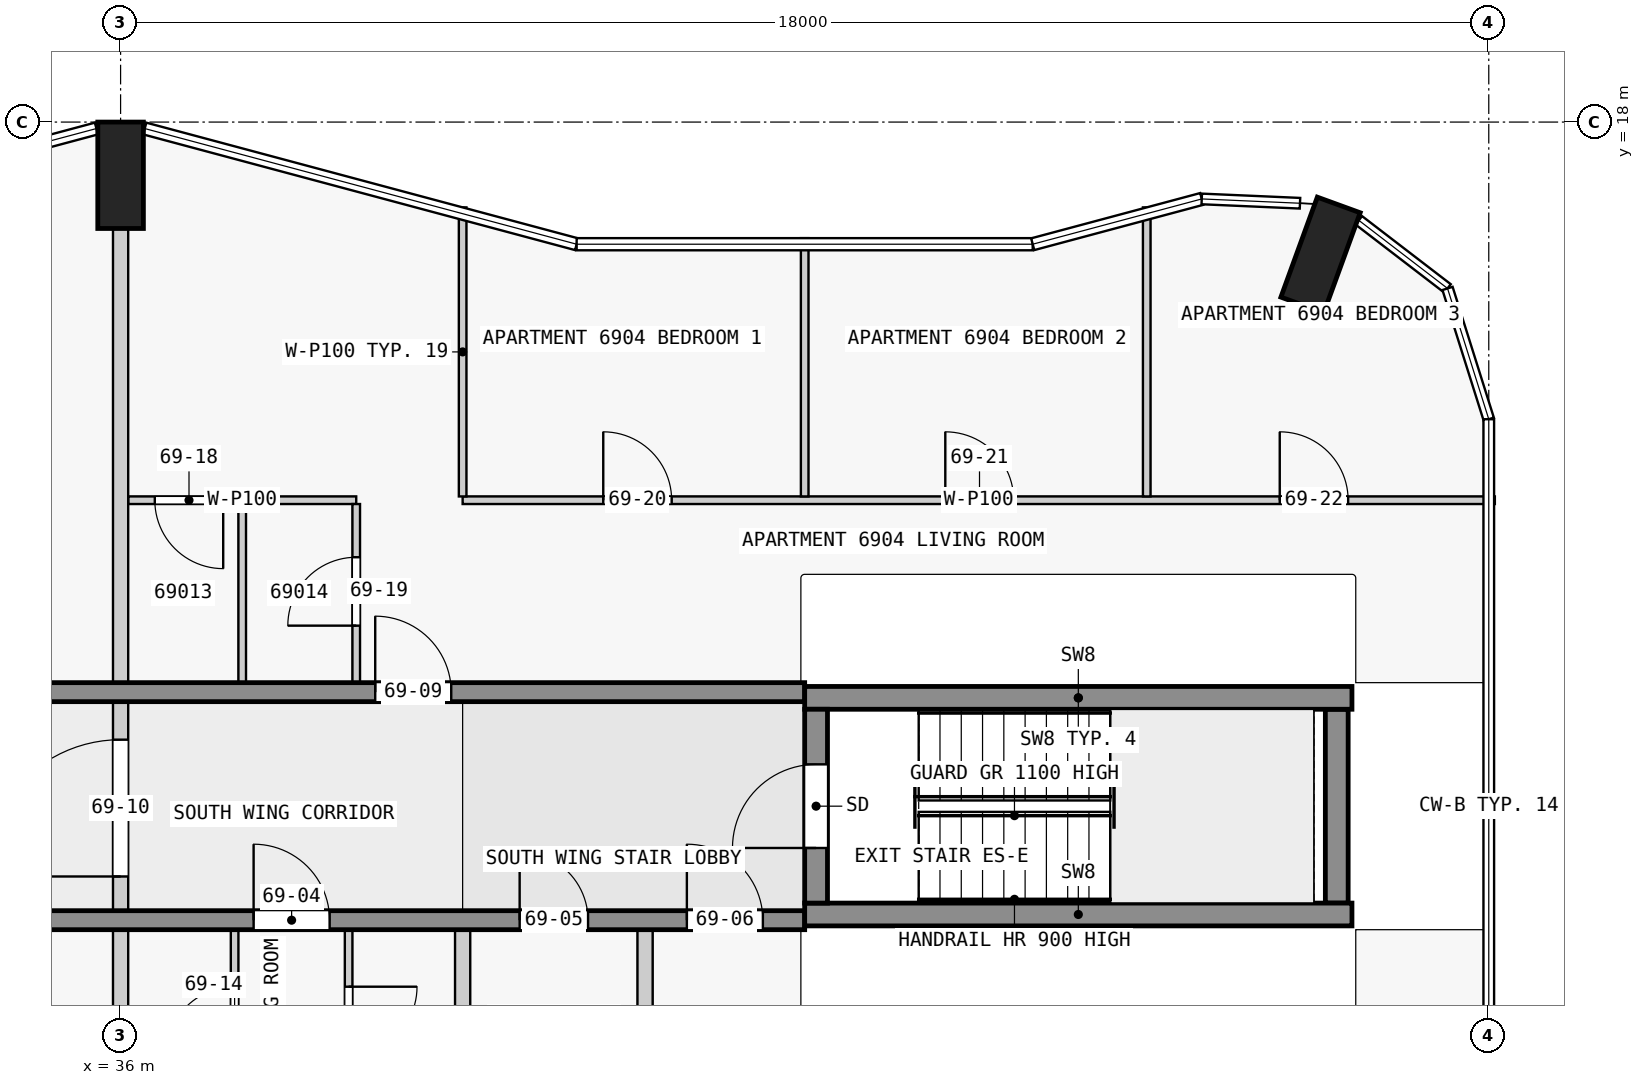
"""IFC4 building model, lengths in metres.
Left out: names, types, materials, properties, quantities, classifications, styles, units other than length and angle.
Written with IfcOpenShell. Run it as: python <this file> out.ifc"""

import sys

from ifc_helpers import new_model, si_unit, direction, frame, frame_2d, origin, origin_2d, place, context, subcontext, project, spatial, rectangle, extrude, element, fill, save


model = new_model("IFC4")
c1 = context("Model", 3, precision=1e-05, world=origin(), true_north=direction((0.0, 1.0)))
c2 = subcontext(c1, "Body", "Model", "MODEL_VIEW")
j1 = project(units=[si_unit("LENGTHUNIT", "METRE"), si_unit("PLANEANGLEUNIT", "RADIAN")], contexts=[c1])
p1 = place(None, origin())
s1 = spatial("IfcSite", under=j1, at=p1, CompositionType="ELEMENT")
p2 = place(p1, origin())
s2 = spatial("IfcBuilding", under=s1, at=p2, CompositionType="ELEMENT")
p3 = place(p2, frame((0.0, 0.0, 263.4)))
s3 = spatial("IfcBuildingStorey", under=s2, at=p3, CompositionType="ELEMENT", Elevation=263.4)
for number, where, z_axis, x_axis in (
    (1, (51.787, 16.252, 0.0), (0.0, 0.0, 1.0), (-0.94, 0.342, 0.0)),
    (2, (36.0, 17.3, 0.0), (0.0, 0.0, 1.0), (1.0, 0.0, 0.0)),
):
    element("IfcColumn", number, at=place(p3, frame(where, z_axis=z_axis, x_axis=x_axis)), inside=s3, PredefinedType="COLUMN", context=c2, shape_type="SweptSolid", body=[
        extrude(rectangle(XDim=0.6, YDim=1.4, at=origin_2d()), origin(), (0.0, 0.0, 1.0), 3.5),
    ])
p4 = place(p3, frame((45.15, 7.725, 0.0), z_axis=(0.0, 0.0, 1.0), x_axis=(0.0, 1.0, 0.0)))
e3 = element("IfcWall", 3, at=p4, inside=s3, PredefinedType="SHEAR", context=c2, shape_type="SweptSolid", body=[
    extrude(rectangle(XDim=2.55, YDim=0.3, at=frame_2d((1.275, 0.0))), origin(), (0.0, 0.0, 1.0), 3.5),
])
p5 = place(p4, frame((0.725, 0.0, 0.0)))
e4 = element("IfcOpeningElement", 4, at=p5, cuts=e3, PredefinedType="OPENING", context=c2, shape_type="SweptSolid", body=[
    extrude(rectangle(XDim=1.1, YDim=2.1, at=frame_2d((0.55, 1.05))), frame((0.0, 0.16, 0.0), z_axis=(0.0, -1.0, 0.0), x_axis=(1.0, 0.0, 0.0)), (0.0, 0.0, 1.0), 0.32),
])
p6 = place(p3, frame((52.0, 7.725, 0.0), z_axis=(0.0, 0.0, 1.0), x_axis=(0.0, 1.0, 0.0)))
e5 = element("IfcWall", 5, at=p6, inside=s3, PredefinedType="SHEAR", context=c2, shape_type="SweptSolid", body=[
    extrude(rectangle(XDim=2.55, YDim=0.3, at=frame_2d((1.275, 0.0))), origin(), (0.0, 0.0, 1.0), 3.5),
])
for number, where, z_axis, x_axis in (
    (6, (45.0, 7.575, 0.0), (0.0, 0.0, 1.0), (1.0, 0.0, 0.0)),
    (7, (45.0, 10.425, 0.0), (0.0, 0.0, 1.0), (1.0, 0.0, 0.0)),
):
    element("IfcWall", number, at=place(p3, frame(where, z_axis=z_axis, x_axis=x_axis)), inside=s3, PredefinedType="SHEAR", context=c2, shape_type="SweptSolid", body=[
        extrude(rectangle(XDim=7.2, YDim=0.3, at=frame_2d((3.6, 0.0))), origin(), (0.0, 0.0, 1.0), 3.5),
    ])
p7 = place(p3, frame((22.5, 7.5, 0.0), z_axis=(0.0, 0.0, 1.0), x_axis=(1.0, 0.0, 0.0)))
e8 = element("IfcWall", 8, at=p7, inside=s3, PredefinedType="SHEAR", context=c2, shape_type="SweptSolid", body=[
    extrude(rectangle(XDim=22.5, YDim=0.25, at=frame_2d((11.25, 0.0))), origin(), (0.0, 0.0, 1.0), 3.25),
])
p8 = place(p7, frame((1.75, 0.0, 0.0)))
e9 = element("IfcOpeningElement", 9, at=p8, cuts=e8, PredefinedType="OPENING", context=c2, shape_type="SweptSolid", body=[
    extrude(rectangle(XDim=1.0, YDim=2.1, at=frame_2d((0.5, 1.05))), frame((0.0, 0.135, 0.0), z_axis=(0.0, -1.0, 0.0), x_axis=(1.0, 0.0, 0.0)), (0.0, 0.0, 1.0), 0.27),
])
p9 = place(p7, frame((6.25, 0.0, 0.0)))
e10 = element("IfcOpeningElement", 10, at=p9, cuts=e8, PredefinedType="OPENING", context=c2, shape_type="SweptSolid", body=[
    extrude(rectangle(XDim=1.0, YDim=2.1, at=frame_2d((0.5, 1.05))), frame((0.0, 0.135, 0.0), z_axis=(0.0, -1.0, 0.0), x_axis=(1.0, 0.0, 0.0)), (0.0, 0.0, 1.0), 0.27),
])
p10 = place(p7, frame((10.35, 0.0, 0.0)))
e11 = element("IfcOpeningElement", 11, at=p10, cuts=e8, PredefinedType="OPENING", context=c2, shape_type="SweptSolid", body=[
    extrude(rectangle(XDim=1.8, YDim=2.1, at=frame_2d((0.9, 1.05))), frame((0.0, 0.135, 0.0), z_axis=(0.0, -1.0, 0.0), x_axis=(1.0, 0.0, 0.0)), (0.0, 0.0, 1.0), 0.27),
])
p11 = place(p7, frame((15.25, 0.0, 0.0)))
e12 = element("IfcOpeningElement", 12, at=p11, cuts=e8, PredefinedType="OPENING", context=c2, shape_type="SweptSolid", body=[
    extrude(rectangle(XDim=1.0, YDim=2.1, at=frame_2d((0.5, 1.05))), frame((0.0, 0.135, 0.0), z_axis=(0.0, -1.0, 0.0), x_axis=(1.0, 0.0, 0.0)), (0.0, 0.0, 1.0), 0.27),
])
p12 = place(p7, frame((18.75, 0.0, 0.0)))
e13 = element("IfcOpeningElement", 13, at=p12, cuts=e8, PredefinedType="OPENING", context=c2, shape_type="SweptSolid", body=[
    extrude(rectangle(XDim=0.9, YDim=2.1, at=frame_2d((0.45, 1.05))), frame((0.0, 0.135, 0.0), z_axis=(0.0, -1.0, 0.0), x_axis=(1.0, 0.0, 0.0)), (0.0, 0.0, 1.0), 0.27),
])
p13 = place(p7, frame((20.95, 0.0, 0.0)))
e14 = element("IfcOpeningElement", 14, at=p13, cuts=e8, PredefinedType="OPENING", context=c2, shape_type="SweptSolid", body=[
    extrude(rectangle(XDim=1.0, YDim=2.1, at=frame_2d((0.5, 1.05))), frame((0.0, 0.135, 0.0), z_axis=(0.0, -1.0, 0.0), x_axis=(1.0, 0.0, 0.0)), (0.0, 0.0, 1.0), 0.27),
])
p14 = place(p3, frame((22.5, 10.5, 0.0), z_axis=(0.0, 0.0, 1.0), x_axis=(1.0, 0.0, 0.0)))
e15 = element("IfcWall", 15, at=p14, inside=s3, PredefinedType="SHEAR", context=c2, shape_type="SweptSolid", body=[
    extrude(rectangle(XDim=22.5, YDim=0.25, at=frame_2d((11.25, 0.0))), origin(), (0.0, 0.0, 1.0), 3.25),
])
p15 = place(p14, frame((1.75, 0.0, 0.0)))
e16 = element("IfcOpeningElement", 16, at=p15, cuts=e15, PredefinedType="OPENING", context=c2, shape_type="SweptSolid", body=[
    extrude(rectangle(XDim=1.0, YDim=2.1, at=frame_2d((0.5, 1.05))), frame((0.0, 0.135, 0.0), z_axis=(0.0, -1.0, 0.0), x_axis=(1.0, 0.0, 0.0)), (0.0, 0.0, 1.0), 0.27),
])
p16 = place(p14, frame((8.55, 0.0, 0.0)))
e17 = element("IfcOpeningElement", 17, at=p16, cuts=e15, PredefinedType="OPENING", context=c2, shape_type="SweptSolid", body=[
    extrude(rectangle(XDim=1.0, YDim=2.1, at=frame_2d((0.5, 1.05))), frame((0.0, 0.135, 0.0), z_axis=(0.0, -1.0, 0.0), x_axis=(1.0, 0.0, 0.0)), (0.0, 0.0, 1.0), 0.27),
])
p17 = place(p14, frame((16.85, 0.0, 0.0)))
e18 = element("IfcOpeningElement", 18, at=p17, cuts=e15, PredefinedType="OPENING", context=c2, shape_type="SweptSolid", body=[
    extrude(rectangle(XDim=1.0, YDim=2.1, at=frame_2d((0.5, 1.05))), frame((0.0, 0.135, 0.0), z_axis=(0.0, -1.0, 0.0), x_axis=(1.0, 0.0, 0.0)), (0.0, 0.0, 1.0), 0.27),
])
p18 = place(p3, frame((39.1, 13.025, 0.0), z_axis=(0.0, 0.0, 1.0), x_axis=(-1.0, 0.0, 0.0)))
e19 = element("IfcWall", 19, at=p18, inside=s3, PredefinedType="PARTITIONING", context=c2, shape_type="SweptSolid", body=[
    extrude(rectangle(XDim=3.0, YDim=0.1, at=frame_2d((1.5, 0.0))), origin(), (0.0, 0.0, 1.0), 3.25),
])
p19 = place(p18, frame((1.75, 0.0, 0.0)))
e20 = element("IfcOpeningElement", 20, at=p19, cuts=e19, PredefinedType="OPENING", context=c2, shape_type="SweptSolid", body=[
    extrude(rectangle(XDim=0.9, YDim=2.1, at=frame_2d((0.45, 1.05))), frame((0.0, 0.06, 0.0), z_axis=(0.0, -1.0, 0.0), x_axis=(1.0, 0.0, 0.0)), (0.0, 0.0, 1.0), 0.12),
])
p20 = place(p3, frame((40.5, 13.025, 0.0), z_axis=(0.0, 0.0, 1.0), x_axis=(1.0, 0.0, 0.0)))
e21 = element("IfcWall", 21, at=p20, inside=s3, PredefinedType="PARTITIONING", context=c2, shape_type="SweptSolid", body=[
    extrude(rectangle(XDim=13.58, YDim=0.1, at=frame_2d((6.79, 0.0))), origin(), (0.0, 0.0, 1.0), 3.25),
])
p21 = place(p20, frame((1.85, 0.0, 0.0)))
e22 = element("IfcOpeningElement", 22, at=p21, cuts=e21, PredefinedType="OPENING", context=c2, shape_type="SweptSolid", body=[
    extrude(rectangle(XDim=0.9, YDim=2.1, at=frame_2d((0.45, 1.05))), frame((0.0, 0.06, 0.0), z_axis=(0.0, -1.0, 0.0), x_axis=(1.0, 0.0, 0.0)), (0.0, 0.0, 1.0), 0.12),
])
p22 = place(p20, frame((6.35, 0.0, 0.0)))
e23 = element("IfcOpeningElement", 23, at=p22, cuts=e21, PredefinedType="OPENING", context=c2, shape_type="SweptSolid", body=[
    extrude(rectangle(XDim=0.9, YDim=2.1, at=frame_2d((0.45, 1.05))), frame((0.0, 0.06, 0.0), z_axis=(0.0, -1.0, 0.0), x_axis=(1.0, 0.0, 0.0)), (0.0, 0.0, 1.0), 0.12),
])
p23 = place(p20, frame((10.75, 0.0, 0.0)))
e24 = element("IfcOpeningElement", 24, at=p23, cuts=e21, PredefinedType="OPENING", context=c2, shape_type="SweptSolid", body=[
    extrude(rectangle(XDim=0.9, YDim=2.1, at=frame_2d((0.45, 1.05))), frame((0.0, 0.06, 0.0), z_axis=(0.0, -1.0, 0.0), x_axis=(1.0, 0.0, 0.0)), (0.0, 0.0, 1.0), 0.12),
])
for number, where, z_axis, x_axis in (
    (25, (36.0, 1.4, 0.0), (0.0, 0.0, 1.0), (0.0, 1.0, 0.0)),
    (26, (36.0, 10.625, 0.0), (0.0, 0.0, 1.0), (0.0, 1.0, 0.0)),
):
    element("IfcWall", number, at=place(p3, frame(where, z_axis=z_axis, x_axis=x_axis)), inside=s3, PredefinedType="PARTITIONING", context=c2, shape_type="SweptSolid", body=[
        extrude(rectangle(XDim=5.975, YDim=0.2, at=frame_2d((2.988, 0.0))), origin(), (0.0, 0.0, 1.0), 3.25),
    ])
p24 = place(p3, frame((37.5, 4.975, 0.0), z_axis=(0.0, 0.0, 1.0), x_axis=(0.0, 1.0, 0.0)))
e27 = element("IfcWall", 27, at=p24, inside=s3, PredefinedType="PARTITIONING", context=c2, shape_type="SweptSolid", body=[
    extrude(rectangle(XDim=2.4, YDim=0.1, at=frame_2d((1.2, 0.0))), origin(), (0.0, 0.0, 1.0), 3.25),
])
p25 = place(p24, frame((0.75, 0.0, 0.0)))
e28 = element("IfcOpeningElement", 28, at=p25, cuts=e27, PredefinedType="OPENING", context=c2, shape_type="SweptSolid", body=[
    extrude(rectangle(XDim=0.9, YDim=2.1, at=frame_2d((0.45, 1.05))), frame((0.0, 0.06, 0.0), z_axis=(0.0, -1.0, 0.0), x_axis=(1.0, 0.0, 0.0)), (0.0, 0.0, 1.0), 0.12),
])
p26 = place(p3, frame((37.6, 10.625, 0.0), z_axis=(0.0, 0.0, 1.0), x_axis=(0.0, 1.0, 0.0)))
e29 = element("IfcWall", 29, at=p26, inside=s3, PredefinedType="PARTITIONING", context=c2, shape_type="SweptSolid", body=[
    extrude(rectangle(XDim=2.35, YDim=0.1, at=frame_2d((1.175, 0.0))), origin(), (0.0, 0.0, 1.0), 3.25),
])
p27 = place(p3, frame((39.0, 7.375, 0.0), z_axis=(0.0, 0.0, 1.0), x_axis=(0.0, -1.0, 0.0)))
e30 = element("IfcWall", 30, at=p27, inside=s3, PredefinedType="PARTITIONING", context=c2, shape_type="SweptSolid", body=[
    extrude(rectangle(XDim=2.4, YDim=0.1, at=frame_2d((1.2, 0.0))), origin(), (0.0, 0.0, 1.0), 3.25),
])
p28 = place(p27, frame((0.75, 0.0, 0.0)))
e31 = element("IfcOpeningElement", 31, at=p28, cuts=e30, PredefinedType="OPENING", context=c2, shape_type="SweptSolid", body=[
    extrude(rectangle(XDim=0.9, YDim=2.1, at=frame_2d((0.45, 1.05))), frame((0.0, 0.06, 0.0), z_axis=(0.0, -1.0, 0.0), x_axis=(1.0, 0.0, 0.0)), (0.0, 0.0, 1.0), 0.12),
])
p29 = place(p3, frame((39.1, 10.625, 0.0), z_axis=(0.0, 0.0, 1.0), x_axis=(0.0, 1.0, 0.0)))
e32 = element("IfcWall", 32, at=p29, inside=s3, PredefinedType="PARTITIONING", context=c2, shape_type="SweptSolid", body=[
    extrude(rectangle(XDim=2.35, YDim=0.1, at=frame_2d((1.175, 0.0))), origin(), (0.0, 0.0, 1.0), 3.25),
])
p30 = place(p29, frame((0.75, 0.0, 0.0)))
e33 = element("IfcOpeningElement", 33, at=p30, cuts=e32, PredefinedType="OPENING", context=c2, shape_type="SweptSolid", body=[
    extrude(rectangle(XDim=0.9, YDim=2.1, at=frame_2d((0.45, 1.05))), frame((0.0, 0.06, 0.0), z_axis=(0.0, -1.0, 0.0), x_axis=(1.0, 0.0, 0.0)), (0.0, 0.0, 1.0), 0.12),
])
p31 = place(p3, frame((40.5, 16.878, 0.0), z_axis=(0.0, 0.0, 1.0), x_axis=(0.0, -1.0, 0.0)))
e34 = element("IfcWall", 34, at=p31, inside=s3, PredefinedType="PARTITIONING", context=c2, shape_type="SweptSolid", body=[
    extrude(rectangle(XDim=3.803, YDim=0.1, at=frame_2d((1.901, 0.0))), origin(), (0.0, 0.0, 1.0), 3.25),
])
for number, where, z_axis, x_axis in (
    (35, (40.5, 5.075, 0.0), (0.0, 0.0, 1.0), (0.0, 1.0, 0.0)),
    (36, (42.9, 5.075, 0.0), (0.0, 0.0, 1.0), (0.0, 1.0, 0.0)),
):
    element("IfcWall", number, at=place(p3, frame(where, z_axis=z_axis, x_axis=x_axis)), inside=s3, PredefinedType="PARTITIONING", context=c2, shape_type="SweptSolid", body=[
        extrude(rectangle(XDim=2.3, YDim=0.2, at=frame_2d((1.15, 0.0))), origin(), (0.0, 0.0, 1.0), 3.25),
    ])
p32 = place(p3, frame((45.0, 13.075, 0.0), z_axis=(0.0, 0.0, 1.0), x_axis=(0.0, 1.0, 0.0)))
e37 = element("IfcWall", 37, at=p32, inside=s3, PredefinedType="PARTITIONING", context=c2, shape_type="SweptSolid", body=[
    extrude(rectangle(XDim=3.398, YDim=0.1, at=frame_2d((1.699, 0.0))), origin(), (0.0, 0.0, 1.0), 3.25),
])
p33 = place(p3, frame((49.5, 13.075, 0.0), z_axis=(0.0, 0.0, 1.0), x_axis=(0.0, 1.0, 0.0)))
e38 = element("IfcWall", 38, at=p33, inside=s3, PredefinedType="PARTITIONING", context=c2, shape_type="SweptSolid", body=[
    extrude(rectangle(XDim=3.803, YDim=0.1, at=frame_2d((1.901, 0.0))), origin(), (0.0, 0.0, 1.0), 3.25),
])
p34 = place(p3, frame((36.0, 7.475, 0.0), z_axis=(0.0, 0.0, 1.0), x_axis=(0.0, 1.0, 0.0)))
e39 = element("IfcWall", 39, at=p34, inside=s3, PredefinedType="PARTITIONING", context=c2, shape_type="SweptSolid", body=[
    extrude(rectangle(XDim=3.05, YDim=0.2, at=frame_2d((1.525, 0.0))), origin(), (0.0, 0.0, 1.0), 3.25),
])
p35 = place(p34, frame((0.6, 0.0, 0.0)))
e40 = element("IfcOpeningElement", 40, at=p35, cuts=e39, PredefinedType="OPENING", context=c2, shape_type="SweptSolid", body=[
    extrude(rectangle(XDim=1.8, YDim=2.1, at=frame_2d((0.9, 1.05))), frame((0.0, 0.11, 0.0), z_axis=(0.0, -1.0, 0.0), x_axis=(1.0, 0.0, 0.0)), (0.0, 0.0, 1.0), 0.22),
])
p36 = place(p5, origin())
e41 = element("IfcDoor", 41, at=p36, inside=s3, OperationType="SINGLE_SWING_LEFT", PredefinedType="DOOR", context=c2, shape_type="SweptSolid", body=[
    extrude(rectangle(XDim=1.1, YDim=2.1, at=frame_2d((0.55, 1.05))), frame((0.0, 0.025, 0.0), z_axis=(0.0, -1.0, 0.0), x_axis=(1.0, 0.0, 0.0)), (0.0, 0.0, 1.0), 0.05),
])
fill(e4, e41)
p37 = place(p11, origin())
e42 = element("IfcDoor", 42, at=p37, inside=s3, OperationType="SINGLE_SWING_RIGHT", PredefinedType="DOOR", context=c2, shape_type="SweptSolid", body=[
    extrude(rectangle(XDim=1.0, YDim=2.1, at=frame_2d((0.5, 1.05))), frame((0.0, 0.025, 0.0), z_axis=(0.0, -1.0, 0.0), x_axis=(1.0, 0.0, 0.0)), (0.0, 0.0, 1.0), 0.05),
])
fill(e12, e42)
p38 = place(p12, origin())
e43 = element("IfcDoor", 43, at=p38, inside=s3, OperationType="SINGLE_SWING_RIGHT", PredefinedType="DOOR", context=c2, shape_type="SweptSolid", body=[
    extrude(rectangle(XDim=0.9, YDim=2.1, at=frame_2d((0.45, 1.05))), frame((0.0, 0.025, 0.0), z_axis=(0.0, -1.0, 0.0), x_axis=(1.0, 0.0, 0.0)), (0.0, 0.0, 1.0), 0.05),
])
fill(e13, e43)
p39 = place(p13, origin())
e44 = element("IfcDoor", 44, at=p39, inside=s3, OperationType="SINGLE_SWING_RIGHT", PredefinedType="DOOR", context=c2, shape_type="SweptSolid", body=[
    extrude(rectangle(XDim=1.0, YDim=2.1, at=frame_2d((0.5, 1.05))), frame((0.0, 0.025, 0.0), z_axis=(0.0, -1.0, 0.0), x_axis=(1.0, 0.0, 0.0)), (0.0, 0.0, 1.0), 0.05),
])
fill(e14, e44)
p40 = place(p17, origin())
e45 = element("IfcDoor", 45, at=p40, inside=s3, OperationType="SINGLE_SWING_RIGHT", PredefinedType="DOOR", context=c2, shape_type="SweptSolid", body=[
    extrude(rectangle(XDim=1.0, YDim=2.1, at=frame_2d((0.5, 1.05))), frame((0.0, 0.025, 0.0), z_axis=(0.0, -1.0, 0.0), x_axis=(1.0, 0.0, 0.0)), (0.0, 0.0, 1.0), 0.05),
])
fill(e18, e45)
p41 = place(p35, origin())
e46 = element("IfcDoor", 46, at=p41, inside=s3, OperationType="SINGLE_SWING_LEFT", PredefinedType="DOOR", context=c2, shape_type="SweptSolid", body=[
    extrude(rectangle(XDim=1.8, YDim=2.1, at=frame_2d((0.9, 1.05))), frame((0.0, 0.025, 0.0), z_axis=(0.0, -1.0, 0.0), x_axis=(1.0, 0.0, 0.0)), (0.0, 0.0, 1.0), 0.05),
])
fill(e40, e46)
p42 = place(p25, origin())
e47 = element("IfcDoor", 47, at=p42, inside=s3, OperationType="SINGLE_SWING_LEFT", PredefinedType="DOOR", context=c2, shape_type="SweptSolid", body=[
    extrude(rectangle(XDim=0.9, YDim=2.1, at=frame_2d((0.45, 1.05))), frame((0.0, 0.025, 0.0), z_axis=(0.0, -1.0, 0.0), x_axis=(1.0, 0.0, 0.0)), (0.0, 0.0, 1.0), 0.05),
])
fill(e28, e47)
p43 = place(p28, origin())
e48 = element("IfcDoor", 48, at=p43, inside=s3, OperationType="SINGLE_SWING_LEFT", PredefinedType="DOOR", context=c2, shape_type="SweptSolid", body=[
    extrude(rectangle(XDim=0.9, YDim=2.1, at=frame_2d((0.45, 1.05))), frame((0.0, 0.025, 0.0), z_axis=(0.0, -1.0, 0.0), x_axis=(1.0, 0.0, 0.0)), (0.0, 0.0, 1.0), 0.05),
])
fill(e31, e48)
p44 = place(p19, origin())
e49 = element("IfcDoor", 49, at=p44, inside=s3, OperationType="SINGLE_SWING_RIGHT", PredefinedType="DOOR", context=c2, shape_type="SweptSolid", body=[
    extrude(rectangle(XDim=0.9, YDim=2.1, at=frame_2d((0.45, 1.05))), frame((0.0, 0.025, 0.0), z_axis=(0.0, -1.0, 0.0), x_axis=(1.0, 0.0, 0.0)), (0.0, 0.0, 1.0), 0.05),
])
fill(e20, e49)
p45 = place(p30, origin())
e50 = element("IfcDoor", 50, at=p45, inside=s3, OperationType="SINGLE_SWING_RIGHT", PredefinedType="DOOR", context=c2, shape_type="SweptSolid", body=[
    extrude(rectangle(XDim=0.9, YDim=2.1, at=frame_2d((0.45, 1.05))), frame((0.0, 0.025, 0.0), z_axis=(0.0, -1.0, 0.0), x_axis=(1.0, 0.0, 0.0)), (0.0, 0.0, 1.0), 0.05),
])
fill(e33, e50)
p46 = place(p21, origin())
e51 = element("IfcDoor", 51, at=p46, inside=s3, OperationType="SINGLE_SWING_LEFT", PredefinedType="DOOR", context=c2, shape_type="SweptSolid", body=[
    extrude(rectangle(XDim=0.9, YDim=2.1, at=frame_2d((0.45, 1.05))), frame((0.0, 0.025, 0.0), z_axis=(0.0, -1.0, 0.0), x_axis=(1.0, 0.0, 0.0)), (0.0, 0.0, 1.0), 0.05),
])
fill(e22, e51)
p47 = place(p22, origin())
e52 = element("IfcDoor", 52, at=p47, inside=s3, OperationType="SINGLE_SWING_RIGHT", PredefinedType="DOOR", context=c2, shape_type="SweptSolid", body=[
    extrude(rectangle(XDim=0.9, YDim=2.1, at=frame_2d((0.45, 1.05))), frame((0.0, 0.025, 0.0), z_axis=(0.0, -1.0, 0.0), x_axis=(1.0, 0.0, 0.0)), (0.0, 0.0, 1.0), 0.05),
])
fill(e23, e52)
p48 = place(p23, origin())
e53 = element("IfcDoor", 53, at=p48, inside=s3, OperationType="SINGLE_SWING_RIGHT", PredefinedType="DOOR", context=c2, shape_type="SweptSolid", body=[
    extrude(rectangle(XDim=0.9, YDim=2.1, at=frame_2d((0.45, 1.05))), frame((0.0, 0.025, 0.0), z_axis=(0.0, -1.0, 0.0), x_axis=(1.0, 0.0, 0.0)), (0.0, 0.0, 1.0), 0.05),
])
fill(e24, e53)
save(model, sys.argv[1])
